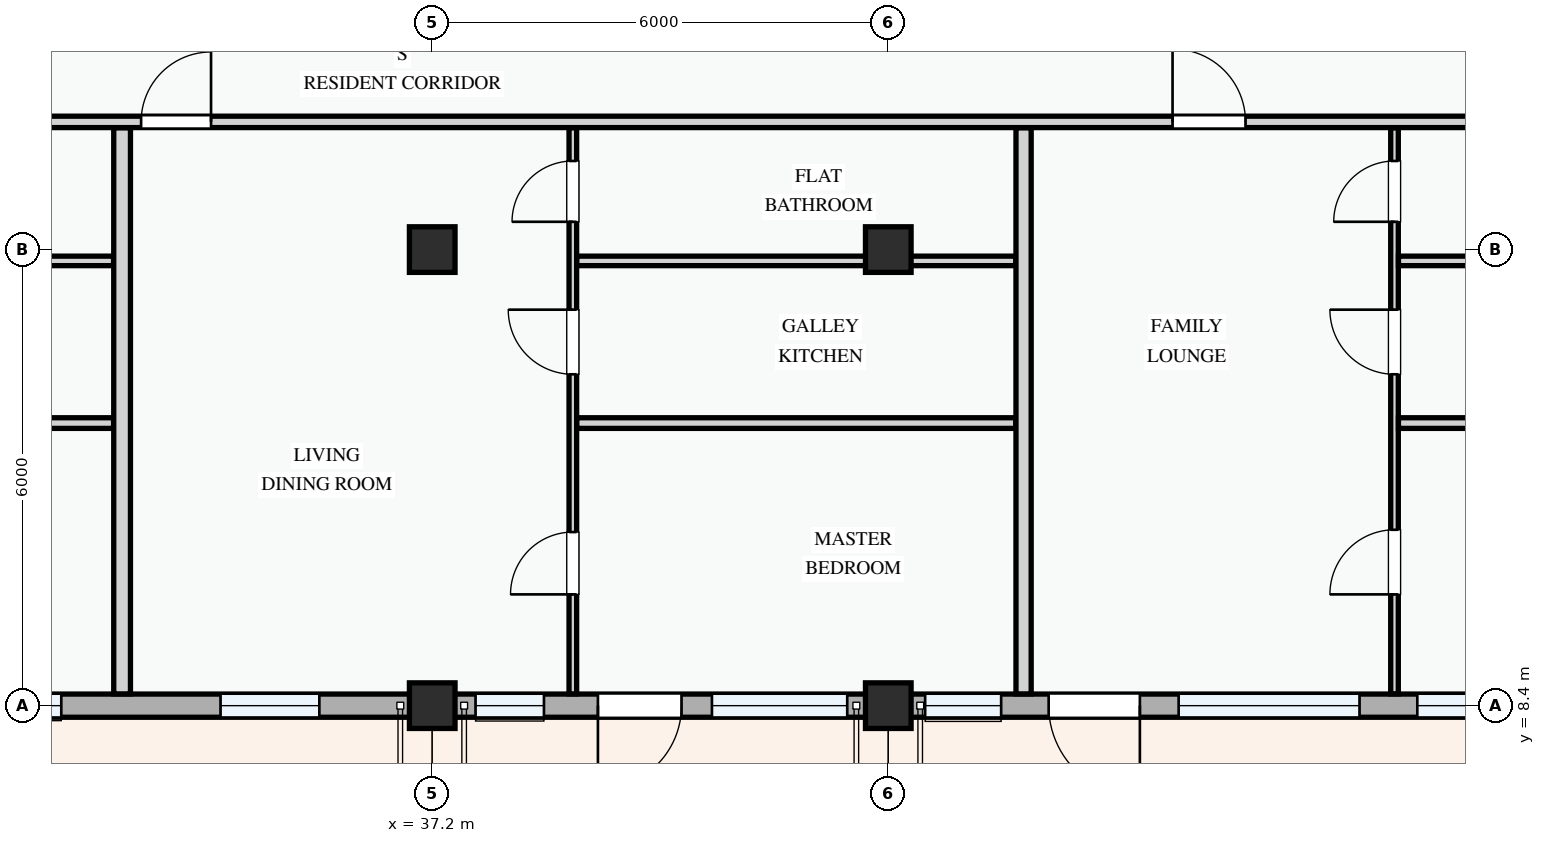
"""IFC4 building model, lengths in metres.
Left out: names, types, materials, properties, quantities, classifications, styles, units other than length and angle.
Written with IfcOpenShell. Run it as: python <this file> out.ifc"""

import sys

from ifc_helpers import new_model, si_unit, direction, frame, frame_2d, origin, origin_2d, place, context, subcontext, project, spatial, rectangle, extrude, element, fill, save


model = new_model("IFC4")
c1 = context("Model", 3, precision=1e-05, world=origin(), true_north=direction((0.0, 1.0)))
c2 = subcontext(c1, "Body", "Model", "MODEL_VIEW")
j1 = project(units=[si_unit("LENGTHUNIT", "METRE"), si_unit("PLANEANGLEUNIT", "RADIAN")], contexts=[c1])
p1 = place(None, origin())
s1 = spatial("IfcSite", under=j1, at=p1, CompositionType="ELEMENT")
p2 = place(p1, origin())
s2 = spatial("IfcBuilding", under=s1, at=p2, CompositionType="ELEMENT")
p3 = place(p2, frame((0.0, 0.0, 18.0)))
s3 = spatial("IfcBuildingStorey", under=s2, at=p3, CompositionType="ELEMENT", Elevation=18.0)
for number, where, z_axis, x_axis in (
    (1, (37.2, 8.4, 0.0), (0.0, 0.0, 1.0), (1.0, 0.0, 0.0)),
    (2, (37.2, 14.4, 0.0), (0.0, 0.0, 1.0), (1.0, 0.0, 0.0)),
    (3, (43.2, 8.4, 0.0), (0.0, 0.0, 1.0), (1.0, 0.0, 0.0)),
    (4, (43.2, 14.4, 0.0), (0.0, 0.0, 1.0), (1.0, 0.0, 0.0)),
):
    element("IfcColumn", number, at=place(p3, frame(where, z_axis=z_axis, x_axis=x_axis)), inside=s3, PredefinedType="COLUMN", context=c2, shape_type="SweptSolid", body=[
        extrude(rectangle(XDim=0.6, YDim=0.6, at=origin_2d()), origin(), (0.0, 0.0, 1.0), 3.3),
    ])
p4 = place(p3, frame((28.8, 8.4, 0.0), z_axis=(0.0, 0.0, 1.0), x_axis=(1.0, 0.0, 0.0)))
e5 = element("IfcWall", 5, at=p4, inside=s3, PredefinedType="STANDARD", context=c2, shape_type="SweptSolid", body=[
    extrude(rectangle(XDim=8.4, YDim=0.305, at=frame_2d((4.2, 0.0))), origin(), (0.0, 0.0, 1.0), 2.375),
])
p5 = place(p4, frame((0.62, 0.0, 0.0)))
e6 = element("IfcOpeningElement", 6, at=p5, cuts=e5, PredefinedType="OPENING", context=c2, shape_type="SweptSolid", body=[
    extrude(rectangle(XDim=1.05, YDim=2.15, at=frame_2d((0.525, 1.075))), frame((0.0, 0.163, 0.0), z_axis=(0.0, -1.0, 0.0), x_axis=(1.0, 0.0, 0.0)), (0.0, 0.0, 1.0), 0.325),
])
p6 = place(p4, frame((2.52, 0.0, 0.78)))
e7 = element("IfcOpeningElement", 7, at=p6, cuts=e5, PredefinedType="OPENING", context=c2, shape_type="SweptSolid", body=[
    extrude(rectangle(XDim=1.0, YDim=1.25, at=frame_2d((0.5, 0.625))), frame((0.0, 0.163, 0.0), z_axis=(0.0, -1.0, 0.0), x_axis=(1.0, 0.0, 0.0)), (0.0, 0.0, 1.0), 0.325),
])
p7 = place(p4, frame((5.615, 0.0, 0.78)))
e8 = element("IfcOpeningElement", 8, at=p7, cuts=e5, PredefinedType="OPENING", context=c2, shape_type="SweptSolid", body=[
    extrude(rectangle(XDim=1.3, YDim=1.4, at=frame_2d((0.65, 0.7))), frame((0.0, 0.163, 0.0), z_axis=(0.0, -1.0, 0.0), x_axis=(1.0, 0.0, 0.0)), (0.0, 0.0, 1.0), 0.325),
])
p8 = place(p3, frame((37.2, 8.4, 0.0), z_axis=(0.0, 0.0, 1.0), x_axis=(1.0, 0.0, 0.0)))
e9 = element("IfcWall", 9, at=p8, inside=s3, PredefinedType="STANDARD", context=c2, shape_type="SweptSolid", body=[
    extrude(rectangle(XDim=6.0, YDim=0.305, at=frame_2d((3.0, 0.0))), origin(), (0.0, 0.0, 1.0), 2.475),
])
p9 = place(p8, frame((2.18, 0.0, 0.0)))
e10 = element("IfcOpeningElement", 10, at=p9, cuts=e9, PredefinedType="OPENING", context=c2, shape_type="SweptSolid", body=[
    extrude(rectangle(XDim=1.1, YDim=2.15, at=frame_2d((0.55, 1.075))), frame((0.0, 0.163, 0.0), z_axis=(0.0, -1.0, 0.0), x_axis=(1.0, 0.0, 0.0)), (0.0, 0.0, 1.0), 0.325),
])
p10 = place(p8, frame((0.57, 0.0, 0.78)))
e11 = element("IfcOpeningElement", 11, at=p10, cuts=e9, PredefinedType="OPENING", context=c2, shape_type="SweptSolid", body=[
    extrude(rectangle(XDim=0.9, YDim=1.2, at=frame_2d((0.45, 0.6))), frame((0.0, 0.163, 0.0), z_axis=(0.0, -1.0, 0.0), x_axis=(1.0, 0.0, 0.0)), (0.0, 0.0, 1.0), 0.325),
])
p11 = place(p8, frame((3.68, 0.0, 0.78)))
e12 = element("IfcOpeningElement", 12, at=p11, cuts=e9, PredefinedType="OPENING", context=c2, shape_type="SweptSolid", body=[
    extrude(rectangle(XDim=1.78, YDim=1.42, at=frame_2d((0.89, 0.71))), frame((0.0, 0.163, 0.0), z_axis=(0.0, -1.0, 0.0), x_axis=(1.0, 0.0, 0.0)), (0.0, 0.0, 1.0), 0.325),
])
p12 = place(p3, frame((43.2, 8.4, 0.0), z_axis=(0.0, 0.0, 1.0), x_axis=(1.0, 0.0, 0.0)))
e13 = element("IfcWall", 13, at=p12, inside=s3, PredefinedType="STANDARD", context=c2, shape_type="SweptSolid", body=[
    extrude(rectangle(XDim=8.4, YDim=0.305, at=frame_2d((4.2, 0.0))), origin(), (0.0, 0.0, 1.0), 2.375),
])
p13 = place(p12, frame((2.11, 0.0, 0.0)))
e14 = element("IfcOpeningElement", 14, at=p13, cuts=e13, PredefinedType="OPENING", context=c2, shape_type="SweptSolid", body=[
    extrude(rectangle(XDim=1.2, YDim=2.15, at=frame_2d((0.6, 1.075))), frame((0.0, 0.163, 0.0), z_axis=(0.0, -1.0, 0.0), x_axis=(1.0, 0.0, 0.0)), (0.0, 0.0, 1.0), 0.325),
])
p14 = place(p12, frame((0.485, 0.0, 0.78)))
e15 = element("IfcOpeningElement", 15, at=p14, cuts=e13, PredefinedType="OPENING", context=c2, shape_type="SweptSolid", body=[
    extrude(rectangle(XDim=1.0, YDim=1.25, at=frame_2d((0.5, 0.625))), frame((0.0, 0.163, 0.0), z_axis=(0.0, -1.0, 0.0), x_axis=(1.0, 0.0, 0.0)), (0.0, 0.0, 1.0), 0.325),
])
p15 = place(p12, frame((3.82, 0.0, 0.78)))
e16 = element("IfcOpeningElement", 16, at=p15, cuts=e13, PredefinedType="OPENING", context=c2, shape_type="SweptSolid", body=[
    extrude(rectangle(XDim=2.38, YDim=1.48, at=frame_2d((1.19, 0.74))), frame((0.0, 0.163, 0.0), z_axis=(0.0, -1.0, 0.0), x_axis=(1.0, 0.0, 0.0)), (0.0, 0.0, 1.0), 0.325),
])
p16 = place(p12, frame((6.96, 0.0, 0.78)))
e17 = element("IfcOpeningElement", 17, at=p16, cuts=e13, PredefinedType="OPENING", context=c2, shape_type="SweptSolid", body=[
    extrude(rectangle(XDim=0.95, YDim=1.15, at=frame_2d((0.475, 0.575))), frame((0.0, 0.163, 0.0), z_axis=(0.0, -1.0, 0.0), x_axis=(1.0, 0.0, 0.0)), (0.0, 0.0, 1.0), 0.325),
])
p17 = place(p3, frame((27.042, 12.118, 0.0), z_axis=(0.0, 0.0, 1.0), x_axis=(1.0, 0.0, 0.0)))
e18 = element("IfcWall", 18, at=p17, inside=s3, PredefinedType="PARTITIONING", context=c2, shape_type="SweptSolid", body=[
    extrude(rectangle(XDim=5.966, YDim=0.14, at=frame_2d((2.983, 0.0))), origin(), (0.0, 0.0, 1.0), 3.0),
])
p18 = place(p3, frame((27.042, 14.251, 0.0), z_axis=(0.0, 0.0, 1.0), x_axis=(1.0, 0.0, 0.0)))
e19 = element("IfcWall", 19, at=p18, inside=s3, PredefinedType="PARTITIONING", context=c2, shape_type="SweptSolid", body=[
    extrude(rectangle(XDim=5.966, YDim=0.125, at=frame_2d((2.983, 0.0))), origin(), (0.0, 0.0, 1.0), 2.375),
])
p19 = place(p3, frame((39.05, 8.554, 0.0), z_axis=(0.0, 0.0, 1.0), x_axis=(0.0, 1.0, 0.0)))
e20 = element("IfcWall", 20, at=p19, inside=s3, PredefinedType="PARTITIONING", context=c2, shape_type="SweptSolid", body=[
    extrude(rectangle(XDim=7.448, YDim=0.1, at=frame_2d((3.724, 0.0))), origin(), (0.0, 0.0, 1.0), 3.0),
])
p20 = place(p19, frame((1.309, 0.0, 0.0)))
e21 = element("IfcOpeningElement", 21, at=p20, cuts=e20, PredefinedType="OPENING", context=c2, shape_type="SweptSolid", body=[
    extrude(rectangle(XDim=0.82, YDim=2.08, at=frame_2d((0.41, 1.04))), frame((0.0, 0.06, 0.0), z_axis=(0.0, -1.0, 0.0), x_axis=(1.0, 0.0, 0.0)), (0.0, 0.0, 1.0), 0.12),
])
p21 = place(p19, frame((4.205, 0.0, 0.0)))
e22 = element("IfcOpeningElement", 22, at=p21, cuts=e20, PredefinedType="OPENING", context=c2, shape_type="SweptSolid", body=[
    extrude(rectangle(XDim=0.85, YDim=2.1, at=frame_2d((0.425, 1.05))), frame((0.0, 0.06, 0.0), z_axis=(0.0, -1.0, 0.0), x_axis=(1.0, 0.0, 0.0)), (0.0, 0.0, 1.0), 0.12),
])
p22 = place(p19, frame((6.211, 0.0, 0.0)))
e23 = element("IfcOpeningElement", 23, at=p22, cuts=e20, PredefinedType="OPENING", context=c2, shape_type="SweptSolid", body=[
    extrude(rectangle(XDim=0.8, YDim=2.1, at=frame_2d((0.4, 1.05))), frame((0.0, 0.06, 0.0), z_axis=(0.0, -1.0, 0.0), x_axis=(1.0, 0.0, 0.0)), (0.0, 0.0, 1.0), 0.12),
])
p23 = place(p3, frame((39.102, 12.118, 0.0), z_axis=(0.0, 0.0, 1.0), x_axis=(1.0, 0.0, 0.0)))
e24 = element("IfcWall", 24, at=p23, inside=s3, PredefinedType="PARTITIONING", context=c2, shape_type="SweptSolid", body=[
    extrude(rectangle(XDim=5.776, YDim=0.14, at=frame_2d((2.888, 0.0))), origin(), (0.0, 0.0, 1.0), 3.0),
])
p24 = place(p3, frame((39.102, 14.251, 0.0), z_axis=(0.0, 0.0, 1.0), x_axis=(1.0, 0.0, 0.0)))
e25 = element("IfcWall", 25, at=p24, inside=s3, PredefinedType="PARTITIONING", context=c2, shape_type="SweptSolid", body=[
    extrude(rectangle(XDim=5.776, YDim=0.125, at=frame_2d((2.888, 0.0))), origin(), (0.0, 0.0, 1.0), 2.375),
])
p25 = place(p3, frame((33.12, 8.554, 0.0), z_axis=(0.0, 0.0, 1.0), x_axis=(0.0, 1.0, 0.0)))
e26 = element("IfcWall", 26, at=p25, inside=s3, PredefinedType="PARTITIONING", context=c2, shape_type="SweptSolid", body=[
    extrude(rectangle(XDim=7.448, YDim=0.22, at=frame_2d((3.724, 0.0))), origin(), (0.0, 0.0, 1.0), 2.585),
])
p26 = place(p3, frame((49.86, 8.554, 0.0), z_axis=(0.0, 0.0, 1.0), x_axis=(0.0, 1.0, 0.0)))
e27 = element("IfcWall", 27, at=p26, inside=s3, PredefinedType="PARTITIONING", context=c2, shape_type="SweptSolid", body=[
    extrude(rectangle(XDim=7.448, YDim=0.1, at=frame_2d((3.724, 0.0))), origin(), (0.0, 0.0, 1.0), 3.0),
])
p27 = place(p26, frame((1.309, 0.0, 0.0)))
e28 = element("IfcOpeningElement", 28, at=p27, cuts=e27, PredefinedType="OPENING", context=c2, shape_type="SweptSolid", body=[
    extrude(rectangle(XDim=0.85, YDim=2.1, at=frame_2d((0.425, 1.05))), frame((0.0, 0.06, 0.0), z_axis=(0.0, -1.0, 0.0), x_axis=(1.0, 0.0, 0.0)), (0.0, 0.0, 1.0), 0.12),
])
p28 = place(p26, frame((4.205, 0.0, 0.0)))
e29 = element("IfcOpeningElement", 29, at=p28, cuts=e27, PredefinedType="OPENING", context=c2, shape_type="SweptSolid", body=[
    extrude(rectangle(XDim=0.85, YDim=2.1, at=frame_2d((0.425, 1.05))), frame((0.0, 0.06, 0.0), z_axis=(0.0, -1.0, 0.0), x_axis=(1.0, 0.0, 0.0)), (0.0, 0.0, 1.0), 0.12),
])
p29 = place(p26, frame((6.211, 0.0, 0.0)))
e30 = element("IfcOpeningElement", 30, at=p29, cuts=e27, PredefinedType="OPENING", context=c2, shape_type="SweptSolid", body=[
    extrude(rectangle(XDim=0.8, YDim=2.1, at=frame_2d((0.4, 1.05))), frame((0.0, 0.06, 0.0), z_axis=(0.0, -1.0, 0.0), x_axis=(1.0, 0.0, 0.0)), (0.0, 0.0, 1.0), 0.12),
])
p30 = place(p3, frame((49.912, 12.118, 0.0), z_axis=(0.0, 0.0, 1.0), x_axis=(1.0, 0.0, 0.0)))
e31 = element("IfcWall", 31, at=p30, inside=s3, PredefinedType="PARTITIONING", context=c2, shape_type="SweptSolid", body=[
    extrude(rectangle(XDim=7.533, YDim=0.14, at=frame_2d((3.767, 0.0))), origin(), (0.0, 0.0, 1.0), 3.0),
])
p31 = place(p3, frame((49.912, 14.251, 0.0), z_axis=(0.0, 0.0, 1.0), x_axis=(1.0, 0.0, 0.0)))
e32 = element("IfcWall", 32, at=p31, inside=s3, PredefinedType="PARTITIONING", context=c2, shape_type="SweptSolid", body=[
    extrude(rectangle(XDim=7.533, YDim=0.125, at=frame_2d((3.767, 0.0))), origin(), (0.0, 0.0, 1.0), 2.375),
])
p32 = place(p3, frame((44.98, 8.554, 0.0), z_axis=(0.0, 0.0, 1.0), x_axis=(0.0, 1.0, 0.0)))
e33 = element("IfcWall", 33, at=p32, inside=s3, PredefinedType="PARTITIONING", context=c2, shape_type="SweptSolid", body=[
    extrude(rectangle(XDim=7.448, YDim=0.2, at=frame_2d((3.724, 0.0))), origin(), (0.0, 0.0, 1.0), 3.0),
])
p33 = place(p3, frame((22.66, 16.08, 0.0), z_axis=(0.0, 0.0, 1.0), x_axis=(1.0, 0.0, 0.0)))
e34 = element("IfcWall", 34, at=p33, inside=s3, PredefinedType="PARTITIONING", context=c2, shape_type="SweptSolid", body=[
    extrude(rectangle(XDim=34.88, YDim=0.15, at=frame_2d((17.44, 0.0))), origin(), (0.0, 0.0, 1.0), 3.0),
])
p34 = place(p33, frame((2.672, 0.0, 0.0)))
e35 = element("IfcOpeningElement", 35, at=p34, cuts=e34, PredefinedType="OPENING", context=c2, shape_type="SweptSolid", body=[
    extrude(rectangle(XDim=0.92, YDim=2.1, at=frame_2d((0.46, 1.05))), frame((0.0, 0.085, 0.0), z_axis=(0.0, -1.0, 0.0), x_axis=(1.0, 0.0, 0.0)), (0.0, 0.0, 1.0), 0.17),
])
p35 = place(p33, frame((10.71, 0.0, 0.0)))
e36 = element("IfcOpeningElement", 36, at=p35, cuts=e34, PredefinedType="OPENING", context=c2, shape_type="SweptSolid", body=[
    extrude(rectangle(XDim=0.92, YDim=2.1, at=frame_2d((0.46, 1.05))), frame((0.0, 0.085, 0.0), z_axis=(0.0, -1.0, 0.0), x_axis=(1.0, 0.0, 0.0)), (0.0, 0.0, 1.0), 0.17),
])
p36 = place(p33, frame((24.28, 0.0, 0.0)))
e37 = element("IfcOpeningElement", 37, at=p36, cuts=e34, PredefinedType="OPENING", context=c2, shape_type="SweptSolid", body=[
    extrude(rectangle(XDim=0.96, YDim=2.12, at=frame_2d((0.48, 1.06))), frame((0.0, 0.085, 0.0), z_axis=(0.0, -1.0, 0.0), x_axis=(1.0, 0.0, 0.0)), (0.0, 0.0, 1.0), 0.17),
])
p37 = place(p6, origin())
e38 = element("IfcWindow", 38, at=p37, inside=s3, PartitioningType="SINGLE_PANEL", PredefinedType="WINDOW", context=c2, shape_type="SweptSolid", body=[
    extrude(rectangle(XDim=1.0, YDim=1.25, at=frame_2d((0.5, 0.625))), frame((0.0, 0.03, 0.0), z_axis=(0.0, -1.0, 0.0), x_axis=(1.0, 0.0, 0.0)), (0.0, 0.0, 1.0), 0.06),
])
fill(e7, e38)
p38 = place(p7, origin())
e39 = element("IfcWindow", 39, at=p38, inside=s3, PartitioningType="SINGLE_PANEL", PredefinedType="WINDOW", context=c2, shape_type="SweptSolid", body=[
    extrude(rectangle(XDim=1.3, YDim=1.4, at=frame_2d((0.65, 0.7))), frame((0.0, 0.03, 0.0), z_axis=(0.0, -1.0, 0.0), x_axis=(1.0, 0.0, 0.0)), (0.0, 0.0, 1.0), 0.06),
])
fill(e8, e39)
p39 = place(p9, frame((1.1, 0.0, 0.0), z_axis=(0.0, 0.0, 1.0), x_axis=(-1.0, 0.0, 0.0)))
e40 = element("IfcDoor", 40, at=p39, inside=s3, OperationType="SINGLE_SWING_RIGHT", PredefinedType="DOOR", context=c2, shape_type="SweptSolid", body=[
    extrude(rectangle(XDim=1.1, YDim=2.15, at=frame_2d((0.55, 1.075))), frame((0.0, 0.025, 0.0), z_axis=(0.0, -1.0, 0.0), x_axis=(1.0, 0.0, 0.0)), (0.0, 0.0, 1.0), 0.05),
])
fill(e10, e40)
p40 = place(p10, origin())
e41 = element("IfcWindow", 41, at=p40, inside=s3, PartitioningType="SINGLE_PANEL", PredefinedType="WINDOW", context=c2, shape_type="SweptSolid", body=[
    extrude(rectangle(XDim=0.9, YDim=1.2, at=frame_2d((0.45, 0.6))), frame((0.0, 0.03, 0.0), z_axis=(0.0, -1.0, 0.0), x_axis=(1.0, 0.0, 0.0)), (0.0, 0.0, 1.0), 0.06),
])
fill(e11, e41)
p41 = place(p11, origin())
e42 = element("IfcWindow", 42, at=p41, inside=s3, PartitioningType="DOUBLE_PANEL_VERTICAL", PredefinedType="WINDOW", context=c2, shape_type="SweptSolid", body=[
    extrude(rectangle(XDim=1.78, YDim=1.42, at=frame_2d((0.89, 0.71))), frame((0.0, 0.03, 0.0), z_axis=(0.0, -1.0, 0.0), x_axis=(1.0, 0.0, 0.0)), (0.0, 0.0, 1.0), 0.06),
])
fill(e12, e42)
p42 = place(p13, frame((1.2, 0.0, 0.0), z_axis=(0.0, 0.0, 1.0), x_axis=(-1.0, 0.0, 0.0)))
e43 = element("IfcDoor", 43, at=p42, inside=s3, OperationType="SINGLE_SWING_LEFT", PredefinedType="DOOR", context=c2, shape_type="SweptSolid", body=[
    extrude(rectangle(XDim=1.2, YDim=2.15, at=frame_2d((0.6, 1.075))), frame((0.0, 0.025, 0.0), z_axis=(0.0, -1.0, 0.0), x_axis=(1.0, 0.0, 0.0)), (0.0, 0.0, 1.0), 0.05),
])
fill(e14, e43)
p43 = place(p14, origin())
e44 = element("IfcWindow", 44, at=p43, inside=s3, PartitioningType="SINGLE_PANEL", PredefinedType="WINDOW", context=c2, shape_type="SweptSolid", body=[
    extrude(rectangle(XDim=1.0, YDim=1.25, at=frame_2d((0.5, 0.625))), frame((0.0, 0.03, 0.0), z_axis=(0.0, -1.0, 0.0), x_axis=(1.0, 0.0, 0.0)), (0.0, 0.0, 1.0), 0.06),
])
fill(e15, e44)
p44 = place(p15, origin())
e45 = element("IfcWindow", 45, at=p44, inside=s3, PartitioningType="DOUBLE_PANEL_VERTICAL", PredefinedType="WINDOW", context=c2, shape_type="SweptSolid", body=[
    extrude(rectangle(XDim=2.38, YDim=1.48, at=frame_2d((1.19, 0.74))), frame((0.0, 0.03, 0.0), z_axis=(0.0, -1.0, 0.0), x_axis=(1.0, 0.0, 0.0)), (0.0, 0.0, 1.0), 0.06),
])
fill(e16, e45)
p45 = place(p16, origin())
e46 = element("IfcWindow", 46, at=p45, inside=s3, PartitioningType="SINGLE_PANEL", PredefinedType="WINDOW", context=c2, shape_type="SweptSolid", body=[
    extrude(rectangle(XDim=0.95, YDim=1.15, at=frame_2d((0.475, 0.575))), frame((0.0, 0.03, 0.0), z_axis=(0.0, -1.0, 0.0), x_axis=(1.0, 0.0, 0.0)), (0.0, 0.0, 1.0), 0.06),
])
fill(e17, e46)
p46 = place(p20, origin())
e47 = element("IfcDoor", 47, at=p46, inside=s3, OperationType="SINGLE_SWING_LEFT", PredefinedType="DOOR", context=c2, shape_type="SweptSolid", body=[
    extrude(rectangle(XDim=0.82, YDim=2.08, at=frame_2d((0.41, 1.04))), frame((0.0, 0.025, 0.0), z_axis=(0.0, -1.0, 0.0), x_axis=(1.0, 0.0, 0.0)), (0.0, 0.0, 1.0), 0.05),
])
fill(e21, e47)
p47 = place(p21, origin())
e48 = element("IfcDoor", 48, at=p47, inside=s3, OperationType="SINGLE_SWING_RIGHT", PredefinedType="DOOR", context=c2, shape_type="SweptSolid", body=[
    extrude(rectangle(XDim=0.85, YDim=2.1, at=frame_2d((0.425, 1.05))), frame((0.0, 0.025, 0.0), z_axis=(0.0, -1.0, 0.0), x_axis=(1.0, 0.0, 0.0)), (0.0, 0.0, 1.0), 0.05),
])
fill(e22, e48)
p48 = place(p22, origin())
e49 = element("IfcDoor", 49, at=p48, inside=s3, OperationType="SINGLE_SWING_LEFT", PredefinedType="DOOR", context=c2, shape_type="SweptSolid", body=[
    extrude(rectangle(XDim=0.8, YDim=2.1, at=frame_2d((0.4, 1.05))), frame((0.0, 0.025, 0.0), z_axis=(0.0, -1.0, 0.0), x_axis=(1.0, 0.0, 0.0)), (0.0, 0.0, 1.0), 0.05),
])
fill(e23, e49)
p49 = place(p27, origin())
e50 = element("IfcDoor", 50, at=p49, inside=s3, OperationType="SINGLE_SWING_LEFT", PredefinedType="DOOR", context=c2, shape_type="SweptSolid", body=[
    extrude(rectangle(XDim=0.85, YDim=2.1, at=frame_2d((0.425, 1.05))), frame((0.0, 0.025, 0.0), z_axis=(0.0, -1.0, 0.0), x_axis=(1.0, 0.0, 0.0)), (0.0, 0.0, 1.0), 0.05),
])
fill(e28, e50)
p50 = place(p28, origin())
e51 = element("IfcDoor", 51, at=p50, inside=s3, OperationType="SINGLE_SWING_RIGHT", PredefinedType="DOOR", context=c2, shape_type="SweptSolid", body=[
    extrude(rectangle(XDim=0.85, YDim=2.1, at=frame_2d((0.425, 1.05))), frame((0.0, 0.025, 0.0), z_axis=(0.0, -1.0, 0.0), x_axis=(1.0, 0.0, 0.0)), (0.0, 0.0, 1.0), 0.05),
])
fill(e29, e51)
p51 = place(p29, origin())
e52 = element("IfcDoor", 52, at=p51, inside=s3, OperationType="SINGLE_SWING_LEFT", PredefinedType="DOOR", context=c2, shape_type="SweptSolid", body=[
    extrude(rectangle(XDim=0.8, YDim=2.1, at=frame_2d((0.4, 1.05))), frame((0.0, 0.025, 0.0), z_axis=(0.0, -1.0, 0.0), x_axis=(1.0, 0.0, 0.0)), (0.0, 0.0, 1.0), 0.05),
])
fill(e30, e52)
p52 = place(p35, origin())
e53 = element("IfcDoor", 53, at=p52, inside=s3, OperationType="SINGLE_SWING_RIGHT", PredefinedType="DOOR", context=c2, shape_type="SweptSolid", body=[
    extrude(rectangle(XDim=0.92, YDim=2.1, at=frame_2d((0.46, 1.05))), frame((0.0, 0.025, 0.0), z_axis=(0.0, -1.0, 0.0), x_axis=(1.0, 0.0, 0.0)), (0.0, 0.0, 1.0), 0.05),
])
fill(e36, e53)
p53 = place(p36, origin())
e54 = element("IfcDoor", 54, at=p53, inside=s3, OperationType="SINGLE_SWING_LEFT", PredefinedType="DOOR", context=c2, shape_type="SweptSolid", body=[
    extrude(rectangle(XDim=0.96, YDim=2.12, at=frame_2d((0.48, 1.06))), frame((0.0, 0.025, 0.0), z_axis=(0.0, -1.0, 0.0), x_axis=(1.0, 0.0, 0.0)), (0.0, 0.0, 1.0), 0.05),
])
fill(e37, e54)
save(model, sys.argv[1])
